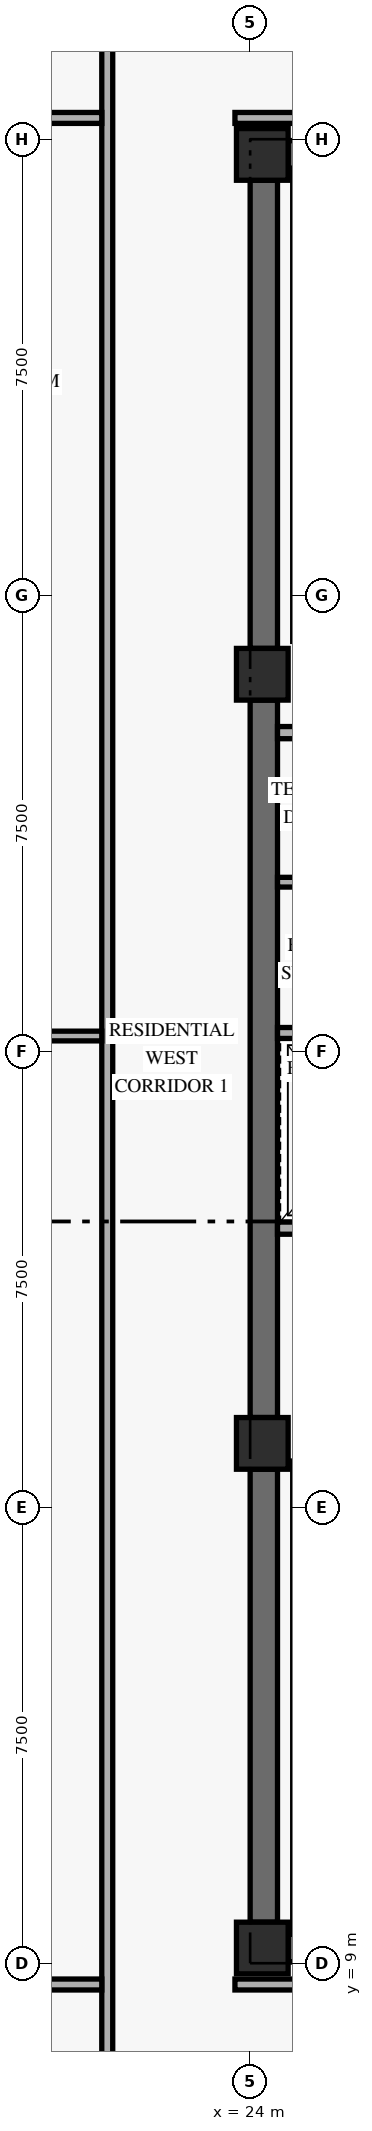
"""IFC4 building model, lengths in metres.
Left out: names, types, materials, properties, quantities, classifications, styles, units other than length and angle.
Written with IfcOpenShell. Run it as: python <this file> out.ifc"""

import sys

from ifc_helpers import new_model, si_unit, direction, frame, frame_2d, origin, origin_2d, place, context, subcontext, project, spatial, rectangle, extrude, element, save


model = new_model("IFC4")
c1 = context("Model", 3, precision=1e-05, world=origin(), true_north=direction((0.0, 1.0)))
c2 = subcontext(c1, "Body", "Model", "MODEL_VIEW")
j1 = project(units=[si_unit("LENGTHUNIT", "METRE"), si_unit("PLANEANGLEUNIT", "RADIAN")], contexts=[c1])
p1 = place(None, origin())
s1 = spatial("IfcSite", under=j1, at=p1, CompositionType="ELEMENT")
p2 = place(p1, origin())
s2 = spatial("IfcBuilding", under=s1, at=p2, CompositionType="ELEMENT")
p3 = place(p2, frame((0.0, 0.0, 27.6)))
s3 = spatial("IfcBuildingStorey", under=s2, at=p3, CompositionType="ELEMENT", Elevation=27.6)
p4 = place(p3, frame((24.225, 9.675, 0.0), z_axis=(0.0, 0.0, 1.0), x_axis=(0.0, 1.0, 0.0)))
e1 = element("IfcWall", 1, at=p4, inside=s3, PredefinedType="SHEAR", context=c2, shape_type="SweptSolid", body=[
    extrude(rectangle(XDim=7.45, YDim=0.45, at=frame_2d((3.725, 0.0))), origin(), (0.0, 0.0, 1.0), 2.667),
])
p5 = place(p3, frame((24.225, 17.975, 0.0), z_axis=(0.0, 0.0, 1.0), x_axis=(0.0, 1.0, 0.0)))
e2 = element("IfcWall", 2, at=p5, inside=s3, PredefinedType="SHEAR", context=c2, shape_type="SweptSolid", body=[
    extrude(rectangle(XDim=11.8, YDim=0.45, at=frame_2d((5.9, 0.0))), origin(), (0.0, 0.0, 1.0), 2.667),
])
p6 = place(p3, frame((24.225, 30.625, 0.0), z_axis=(0.0, 0.0, 1.0), x_axis=(0.0, 1.0, 0.0)))
e3 = element("IfcWall", 3, at=p6, inside=s3, PredefinedType="SHEAR", context=c2, shape_type="SweptSolid", body=[
    extrude(rectangle(XDim=7.7, YDim=0.45, at=frame_2d((3.85, 0.0))), origin(), (0.0, 0.0, 1.0), 2.667),
])
for number, where, z_axis, x_axis in (
    (4, (24.625, 9.25, 0.0), (0.0, 0.0, 1.0), (1.0, 0.0, 0.0)),
    (5, (24.625, 38.75, 0.0), (0.0, 0.0, 1.0), (1.0, 0.0, 0.0)),
):
    element("IfcWall", number, at=place(p3, frame(where, z_axis=z_axis, x_axis=x_axis)), inside=s3, PredefinedType="SHEAR", context=c2, shape_type="SweptSolid", body=[
        extrude(rectangle(XDim=10.15, YDim=0.45, at=frame_2d((5.075, 0.0))), origin(), (0.0, 0.0, 1.0), 3.36),
    ])
for number, where, z_axis, x_axis in (
    (6, (24.2, 9.25, 0.0), (0.0, 0.0, 1.0), (1.0, 0.0, 0.0)),
    (7, (24.2, 17.55, 0.0), (0.0, 0.0, 1.0), (1.0, 0.0, 0.0)),
    (8, (24.2, 30.2, 0.0), (0.0, 0.0, 1.0), (1.0, 0.0, 0.0)),
    (9, (24.2, 38.75, 0.0), (0.0, 0.0, 1.0), (1.0, 0.0, 0.0)),
):
    element("IfcColumn", number, at=place(p3, frame(where, z_axis=z_axis, x_axis=x_axis)), inside=s3, PredefinedType="COLUMN", context=c2, shape_type="SweptSolid", body=[
        extrude(rectangle(XDim=0.85, YDim=0.85, at=origin_2d()), origin(), (0.0, 0.0, 1.0), 3.6),
    ])
p7 = place(p3, frame((24.45, 21.09, 0.0), z_axis=(0.0, 0.0, 1.0), x_axis=(1.0, 0.0, 0.0)))
e10 = element("IfcWall", 10, at=p7, inside=s3, PredefinedType="STANDARD", context=c2, shape_type="SweptSolid", body=[
    extrude(rectangle(XDim=6.83, YDim=0.2, at=frame_2d((3.415, 0.0))), origin(), (0.0, 0.0, 1.0), 3.36),
])
p8 = place(p7, frame((0.72, 0.0, 0.0)))
e11 = element("IfcOpeningElement", 11, at=p8, cuts=e10, PredefinedType="OPENING", context=c2, shape_type="SweptSolid", body=[
    extrude(rectangle(XDim=1.1, YDim=2.2, at=frame_2d((0.55, 1.1))), frame((0.0, 0.11, 0.0), z_axis=(0.0, -1.0, 0.0), x_axis=(1.0, 0.0, 0.0)), (0.0, 0.0, 1.0), 0.22),
])
p9 = place(p7, frame((3.32, 0.0, 0.0)))
e12 = element("IfcOpeningElement", 12, at=p9, cuts=e10, PredefinedType="OPENING", context=c2, shape_type="SweptSolid", body=[
    extrude(rectangle(XDim=1.1, YDim=2.2, at=frame_2d((0.55, 1.1))), frame((0.0, 0.11, 0.0), z_axis=(0.0, -1.0, 0.0), x_axis=(1.0, 0.0, 0.0)), (0.0, 0.0, 1.0), 0.22),
])
p10 = place(p3, frame((24.45, 24.3, 0.0), z_axis=(0.0, 0.0, 1.0), x_axis=(1.0, 0.0, 0.0)))
e13 = element("IfcWall", 13, at=p10, inside=s3, PredefinedType="STANDARD", context=c2, shape_type="SweptSolid", body=[
    extrude(rectangle(XDim=6.83, YDim=0.18, at=frame_2d((3.415, 0.0))), origin(), (0.0, 0.0, 1.0), 3.36),
])
p11 = place(p3, frame((24.45, 29.24, 0.0), z_axis=(0.0, 0.0, 1.0), x_axis=(1.0, 0.0, 0.0)))
e14 = element("IfcWall", 14, at=p11, inside=s3, PredefinedType="STANDARD", context=c2, shape_type="SweptSolid", body=[
    extrude(rectangle(XDim=3.65, YDim=0.2, at=frame_2d((1.825, 0.0))), origin(), (0.0, 0.0, 1.0), 3.36),
])
p12 = place(p3, frame((24.45, 26.78, 0.0), z_axis=(0.0, 0.0, 1.0), x_axis=(1.0, 0.0, 0.0)))
e15 = element("IfcWall", 15, at=p12, inside=s3, PredefinedType="PARTITIONING", context=c2, shape_type="SweptSolid", body=[
    extrude(rectangle(XDim=3.55, YDim=0.16, at=frame_2d((1.775, 0.0))), origin(), (0.0, 0.0, 1.0), 3.36),
])
p13 = place(p3, frame((21.65, 6.8, 0.0), z_axis=(0.0, 0.0, 1.0), x_axis=(0.0, 1.0, 0.0)))
e16 = element("IfcWall", 16, at=p13, inside=s3, PredefinedType="STANDARD", context=c2, shape_type="SweptSolid", body=[
    extrude(rectangle(XDim=34.4, YDim=0.18, at=frame_2d((17.2, 0.0))), origin(), (0.0, 0.0, 1.0), 2.649),
])
for number, where, z_axis, x_axis in (
    (17, (23.75, 8.65, 0.0), (0.0, 0.0, 1.0), (1.0, 0.0, 0.0)),
    (18, (23.75, 39.35, 0.0), (0.0, 0.0, 1.0), (1.0, 0.0, 0.0)),
):
    element("IfcWall", number, at=place(p3, frame(where, z_axis=z_axis, x_axis=x_axis)), inside=s3, PredefinedType="STANDARD", context=c2, shape_type="SweptSolid", body=[
        extrude(rectangle(XDim=11.67, YDim=0.18, at=frame_2d((5.835, 0.0))), origin(), (0.0, 0.0, 1.0), 2.649),
    ])
for number, where, z_axis, x_axis in (
    (19, (14.19, 8.65, 0.0), (0.0, 0.0, 1.0), (1.0, 0.0, 0.0)),
    (20, (14.19, 39.35, 0.0), (0.0, 0.0, 1.0), (1.0, 0.0, 0.0)),
):
    element("IfcWall", number, at=place(p3, frame(where, z_axis=z_axis, x_axis=x_axis)), inside=s3, PredefinedType="STANDARD", context=c2, shape_type="SweptSolid", body=[
        extrude(rectangle(XDim=7.37, YDim=0.18, at=frame_2d((3.685, 0.0))), origin(), (0.0, 0.0, 1.0), 2.649),
    ])
p14 = place(p3, frame((14.19, 24.25, 0.0), z_axis=(0.0, 0.0, 1.0), x_axis=(1.0, 0.0, 0.0)))
e21 = element("IfcWall", 21, at=p14, inside=s3, PredefinedType="PARTITIONING", context=c2, shape_type="SweptSolid", body=[
    extrude(rectangle(XDim=7.37, YDim=0.16, at=frame_2d((3.685, 0.0))), origin(), (0.0, 0.0, 1.0), 2.649),
])
save(model, sys.argv[1])
